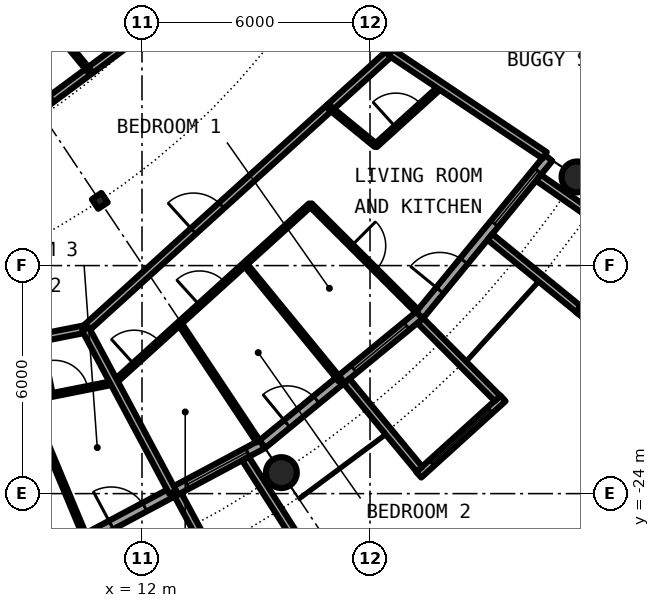
"""IFC4 building model, lengths in metres.
Left out: names, types, materials, properties, quantities, classifications, styles, units other than length and angle.
Written with IfcOpenShell. Run it as: python <this file> out.ifc"""

import sys

from ifc_helpers import new_model, si_unit, direction, frame, frame_2d, origin, origin_2d, place, context, subcontext, project, spatial, rectangle, circle, hollow_circle, i_section, extrude, element, fill, save


model = new_model("IFC4")
c1 = context("Model", 3, precision=1e-05, world=origin(), true_north=direction((0.0, 1.0)))
c2 = subcontext(c1, "Body", "Model", "MODEL_VIEW")
j1 = project(units=[si_unit("LENGTHUNIT", "METRE"), si_unit("PLANEANGLEUNIT", "RADIAN")], contexts=[c1])
p1 = place(None, origin())
s1 = spatial("IfcSite", under=j1, at=p1, CompositionType="ELEMENT")
p2 = place(p1, origin())
s2 = spatial("IfcBuilding", under=s1, at=p2, CompositionType="ELEMENT")
p3 = place(p2, frame((0.0, 0.0, 227.95)))
s3 = spatial("IfcBuildingStorey", under=s2, at=p3, CompositionType="ELEMENT", Elevation=227.95)
for number, where, z_axis, x_axis in (
    (1, (15.667, -23.448, 0.0), (0.0, 0.0, 1.0), (1.0, 0.0, 0.0)),
    (2, (23.448, -15.667, 0.0), (0.0, 0.0, 1.0), (1.0, 0.0, 0.0)),
):
    element("IfcColumn", number, at=place(p3, frame(where, z_axis=z_axis, x_axis=x_axis)), inside=s3, PredefinedType="COLUMN", context=c2, shape_type="SweptSolid", body=[
        extrude(hollow_circle(Radius=0.406, WallThickness=0.03, at=origin_2d()), origin(), (0.0, 0.0, 1.0), 3.05),
    ])
p4 = place(p3, frame((10.889, -16.297, 0.0), z_axis=(0.0, 0.0, 1.0), x_axis=(0.55557023302, -0.831469612303, 0.0)))
e3 = element("IfcColumn", 3, at=p4, inside=s3, PredefinedType="COLUMN", context=c2, shape_type="SweptSolid", body=[
    extrude(i_section(OverallWidth=0.3, OverallDepth=0.3, WebThickness=0.011, FlangeThickness=0.019, FilletRadius=0.027, at=origin_2d()), origin(), (0.0, 0.0, 1.0), 3.05),
])
p5 = place(p3, frame((10.447, -25.222, 0.0), z_axis=(0.0, 0.0, 1.0), x_axis=(0.881915646801, 0.471407246368, 0.0)))
e4 = element("IfcWall", 4, at=p5, inside=s3, PredefinedType="SOLIDWALL", context=c2, shape_type="SweptSolid", body=[
    extrude(rectangle(XDim=5.352, YDim=0.25, at=frame_2d((2.676, 0.0))), origin(), (0.0, 0.0, 1.0), 2.7),
])
p6 = place(p5, frame((0.841, 0.0, 0.0)))
e5 = element("IfcOpeningElement", 5, at=p6, cuts=e4, PredefinedType="OPENING", context=c2, shape_type="SweptSolid", body=[
    extrude(rectangle(XDim=1.0, YDim=2.2, at=frame_2d((0.5, 1.1))), frame((0.0, 0.135, 0.0), z_axis=(0.0, -1.0, 0.0), x_axis=(1.0, 0.0, 0.0)), (0.0, 0.0, 1.0), 0.27),
])
p7 = place(p5, frame((3.111, 0.0, 0.3)))
e6 = element("IfcOpeningElement", 6, at=p7, cuts=e4, PredefinedType="OPENING", context=c2, shape_type="SweptSolid", body=[
    extrude(rectangle(XDim=1.8, YDim=2.1, at=frame_2d((0.9, 1.05))), frame((0.0, 0.135, 0.0), z_axis=(0.0, -1.0, 0.0), x_axis=(1.0, 0.0, 0.0)), (0.0, 0.0, 1.0), 0.27),
])
p8 = place(p3, frame((12.945, -24.029, -0.03), z_axis=(0.0, 0.0, 1.0), x_axis=(0.474424310775, -0.88029629861, 0.0)))
e7 = element("IfcWall", 7, at=p8, inside=s3, PredefinedType="SOLIDWALL", context=c2, shape_type="SweptSolid", body=[
    extrude(rectangle(XDim=3.006, YDim=0.2, at=frame_2d((1.503, 0.0))), origin(), (0.0, 0.0, 1.0), 2.73),
])
p9 = place(p3, frame((14.722, -23.079, -0.03), z_axis=(0.0, 0.0, 1.0), x_axis=(0.537572179146, -0.843217737129, 0.0)))
e8 = element("IfcWall", 8, at=p9, inside=s3, PredefinedType="SOLIDWALL", context=c2, shape_type="SweptSolid", body=[
    extrude(rectangle(XDim=2.924, YDim=0.2, at=frame_2d((1.462, 0.0))), origin(), (0.0, 0.0, 1.0), 2.73),
])
p10 = place(p3, frame((15.167, -22.699, 0.0), z_axis=(0.0, 0.0, 1.0), x_axis=(0.773019449054, 0.634382322723, 0.0)))
e9 = element("IfcWall", 9, at=p10, inside=s3, PredefinedType="SOLIDWALL", context=c2, shape_type="SweptSolid", body=[
    extrude(rectangle(XDim=5.352, YDim=0.25, at=frame_2d((2.676, 0.0))), origin(), (0.0, 0.0, 1.0), 2.7),
])
p11 = place(p10, frame((0.841, 0.0, 0.0)))
e10 = element("IfcOpeningElement", 10, at=p11, cuts=e9, PredefinedType="OPENING", context=c2, shape_type="SweptSolid", body=[
    extrude(rectangle(XDim=1.0, YDim=2.2, at=frame_2d((0.5, 1.1))), frame((0.0, 0.135, 0.0), z_axis=(0.0, -1.0, 0.0), x_axis=(1.0, 0.0, 0.0)), (0.0, 0.0, 1.0), 0.27),
])
p12 = place(p10, frame((3.111, 0.0, 0.3)))
e11 = element("IfcOpeningElement", 11, at=p12, cuts=e9, PredefinedType="OPENING", context=c2, shape_type="SweptSolid", body=[
    extrude(rectangle(XDim=1.8, YDim=2.1, at=frame_2d((0.9, 1.05))), frame((0.0, 0.135, 0.0), z_axis=(0.0, -1.0, 0.0), x_axis=(1.0, 0.0, 0.0)), (0.0, 0.0, 1.0), 0.27),
])
p13 = place(p3, frame((19.282, -23.503, -0.03), z_axis=(0.0, 0.0, 1.0), x_axis=(0.740998365753, 0.671506829416, 0.0)))
e12 = element("IfcWall", 12, at=p13, inside=s3, PredefinedType="SOLIDWALL", context=c2, shape_type="SweptSolid", body=[
    extrude(rectangle(XDim=2.993, YDim=0.2, at=frame_2d((1.497, 0.0))), origin(), (0.0, 0.0, 1.0), 2.73),
])
p14 = place(p13, frame((0.457, 0.0, 0.33)))
e13 = element("IfcOpeningElement", 13, at=p14, cuts=e12, PredefinedType="OPENING", context=c2, shape_type="SweptSolid", body=[
    extrude(circle(Radius=1.04, at=frame_2d((1.04, 1.04))), frame((0.0, 0.11, 0.0), z_axis=(0.0, -1.0, 0.0), x_axis=(1.0, 0.0, 0.0)), (0.0, 0.0, 1.0), 0.22),
])
p15 = place(p3, frame((17.384, -21.041, -0.03), z_axis=(0.0, 0.0, 1.0), x_axis=(0.63709551667, -0.770784861449, 0.0)))
e14 = element("IfcWall", 14, at=p15, inside=s3, PredefinedType="SOLIDWALL", context=c2, shape_type="SweptSolid", body=[
    extrude(rectangle(XDim=3.006, YDim=0.2, at=frame_2d((1.503, 0.0))), origin(), (0.0, 0.0, 1.0), 2.73),
])
p16 = place(p3, frame((19.323, -19.45, -0.03), z_axis=(0.0, 0.0, 1.0), x_axis=(0.704476739375, -0.709727076896, 0.0)))
e15 = element("IfcWall", 15, at=p16, inside=s3, PredefinedType="SOLIDWALL", context=c2, shape_type="SweptSolid", body=[
    extrude(rectangle(XDim=2.883, YDim=0.2, at=frame_2d((1.441, 0.0))), origin(), (0.0, 0.0, 1.0), 2.73),
])
p17 = place(p3, frame((19.304, -19.304, 0.0), z_axis=(0.0, 0.0, 1.0), x_axis=(0.634382322723, 0.773019449054, 0.0)))
e16 = element("IfcWall", 16, at=p17, inside=s3, PredefinedType="SOLIDWALL", context=c2, shape_type="SweptSolid", body=[
    extrude(rectangle(XDim=5.352, YDim=0.25, at=frame_2d((2.676, 0.0))), origin(), (0.0, 0.0, 1.0), 2.7),
])
p18 = place(p17, frame((0.841, 0.0, 0.0)))
e17 = element("IfcOpeningElement", 17, at=p18, cuts=e16, PredefinedType="OPENING", context=c2, shape_type="SweptSolid", body=[
    extrude(rectangle(XDim=1.0, YDim=2.2, at=frame_2d((0.5, 1.1))), frame((0.0, 0.135, 0.0), z_axis=(0.0, -1.0, 0.0), x_axis=(1.0, 0.0, 0.0)), (0.0, 0.0, 1.0), 0.27),
])
p19 = place(p17, frame((3.111, 0.0, 0.3)))
e18 = element("IfcOpeningElement", 18, at=p19, cuts=e16, PredefinedType="OPENING", context=c2, shape_type="SweptSolid", body=[
    extrude(rectangle(XDim=1.8, YDim=2.1, at=frame_2d((0.9, 1.05))), frame((0.0, 0.135, 0.0), z_axis=(0.0, -1.0, 0.0), x_axis=(1.0, 0.0, 0.0)), (0.0, 0.0, 1.0), 0.27),
])
p20 = place(p3, frame((23.497, -19.289, -0.03), z_axis=(0.0, 0.0, 1.0), x_axis=(0.602806268067, 0.797887588059, 0.0)))
e19 = element("IfcWall", 19, at=p20, inside=s3, PredefinedType="SOLIDWALL", context=c2, shape_type="SweptSolid", body=[
    extrude(rectangle(XDim=2.447, YDim=0.2, at=frame_2d((1.223, 0.0))), origin(), (0.0, 0.0, 1.0), 2.73),
])
p21 = place(p20, frame((0.183, 0.0, 0.33)))
e20 = element("IfcOpeningElement", 20, at=p21, cuts=e19, PredefinedType="OPENING", context=c2, shape_type="SweptSolid", body=[
    extrude(circle(Radius=1.04, at=frame_2d((1.04, 1.04))), frame((0.0, 0.11, 0.0), z_axis=(0.0, -1.0, 0.0), x_axis=(1.0, 0.0, 0.0)), (0.0, 0.0, 1.0), 0.22),
])
p22 = place(p3, frame((21.155, -17.246, -0.03), z_axis=(0.0, 0.0, 1.0), x_axis=(0.775179004516, -0.631741648902, 0.0)))
e21 = element("IfcWall", 21, at=p22, inside=s3, PredefinedType="SOLIDWALL", context=c2, shape_type="SweptSolid", body=[
    extrude(rectangle(XDim=3.006, YDim=0.2, at=frame_2d((1.503, 0.0))), origin(), (0.0, 0.0, 1.0), 2.73),
])
p23 = place(p3, frame((22.433, -15.688, -0.03), z_axis=(0.0, 0.0, 1.0), x_axis=(0.819373043115, -0.573260687834, 0.0)))
e22 = element("IfcWall", 22, at=p23, inside=s3, PredefinedType="SOLIDWALL", context=c2, shape_type="SweptSolid", body=[
    extrude(rectangle(XDim=2.925, YDim=0.2, at=frame_2d((1.463, 0.0))), origin(), (0.0, 0.0, 1.0), 2.73),
])
p24 = place(p3, frame((11.266, -21.078, 0.0), z_axis=(0.0, 0.0, 1.0), x_axis=(0.74114118713, 0.671349194339, 0.0)))
e23 = element("IfcWall", 23, at=p24, inside=s3, PredefinedType="PARTITIONING", context=c2, shape_type="SweptSolid", body=[
    extrude(rectangle(XDim=6.965, YDim=0.1, at=frame_2d((3.482, 0.0))), origin(), (0.0, 0.0, 1.0), 2.7),
])
p25 = place(p24, frame((3.034, 0.0, 0.0)))
e24 = element("IfcOpeningElement", 24, at=p25, cuts=e23, PredefinedType="OPENING", context=c2, shape_type="SweptSolid", body=[
    extrude(rectangle(XDim=0.9, YDim=2.3, at=frame_2d((0.45, 1.15))), frame((0.0, 0.06, 0.0), z_axis=(0.0, -1.0, 0.0), x_axis=(1.0, 0.0, 0.0)), (0.0, 0.0, 1.0), 0.12),
])
p26 = place(p24, frame((0.712, 0.0, 0.0)))
e25 = element("IfcOpeningElement", 25, at=p26, cuts=e23, PredefinedType="OPENING", context=c2, shape_type="SweptSolid", body=[
    extrude(rectangle(XDim=0.9, YDim=2.3, at=frame_2d((0.45, 1.15))), frame((0.0, 0.06, 0.0), z_axis=(0.0, -1.0, 0.0), x_axis=(1.0, 0.0, 0.0)), (0.0, 0.0, 1.0), 0.12),
])
p27 = place(p3, frame((18.147, -14.844, 0.0), z_axis=(0.0, 0.0, 1.0), x_axis=(0.741080073381, 0.671416655169, 0.0)))
e26 = element("IfcWall", 26, at=p27, inside=s3, PredefinedType="PARTITIONING", context=c2, shape_type="SweptSolid", body=[
    extrude(rectangle(XDim=2.323, YDim=0.1, at=frame_2d((1.162, 0.0))), origin(), (0.0, 0.0, 1.0), 2.7),
])
p28 = place(p27, frame((0.718, 0.0, 0.0)))
e27 = element("IfcOpeningElement", 27, at=p28, cuts=e26, PredefinedType="OPENING", context=c2, shape_type="SweptSolid", body=[
    extrude(rectangle(XDim=0.9, YDim=2.3, at=frame_2d((0.45, 1.15))), frame((0.0, 0.06, 0.0), z_axis=(0.0, -1.0, 0.0), x_axis=(1.0, 0.0, 0.0)), (0.0, 0.0, 1.0), 0.12),
])
p29 = place(p3, frame((4.46, -22.433, 0.0), z_axis=(0.0, 0.0, 1.0), x_axis=(0.980795304313, 0.195039921651, 0.0)))
e28 = element("IfcWall", 28, at=p29, inside=s3, PredefinedType="PARTITIONING", context=c2, shape_type="SweptSolid", body=[
    extrude(rectangle(XDim=6.937, YDim=0.1, at=frame_2d((3.469, 0.0))), origin(), (0.0, 0.0, 1.0), 2.7),
])
p30 = place(p29, frame((3.021, 0.0, 0.0)))
e29 = element("IfcOpeningElement", 29, at=p30, cuts=e28, PredefinedType="OPENING", context=c2, shape_type="SweptSolid", body=[
    extrude(rectangle(XDim=0.9, YDim=2.3, at=frame_2d((0.45, 1.15))), frame((0.0, 0.06, 0.0), z_axis=(0.0, -1.0, 0.0), x_axis=(1.0, 0.0, 0.0)), (0.0, 0.0, 1.0), 0.12),
])
p31 = place(p29, frame((5.334, 0.0, 0.0)))
e30 = element("IfcOpeningElement", 30, at=p31, cuts=e28, PredefinedType="OPENING", context=c2, shape_type="SweptSolid", body=[
    extrude(rectangle(XDim=0.9, YDim=2.3, at=frame_2d((0.45, 1.15))), frame((0.0, 0.06, 0.0), z_axis=(0.0, -1.0, 0.0), x_axis=(1.0, 0.0, 0.0)), (0.0, 0.0, 1.0), 0.12),
])
p32 = place(p3, frame((18.542, -12.389, 0.0), z_axis=(0.0, 0.0, 1.0), x_axis=(0.465812036273, 0.88488369115, 0.0)))
e31 = element("IfcWall", 31, at=p32, inside=s3, PredefinedType="PARTITIONING", context=c2, shape_type="SweptSolid", body=[
    extrude(rectangle(XDim=1.687, YDim=0.2, at=frame_2d((0.844, 0.0))), origin(), (0.0, 0.0, 1.0), 2.7),
])
p33 = place(p3, frame((10.512, -19.667, 0.0), z_axis=(0.0, 0.0, 1.0), x_axis=(0.740947367223, 0.671563101283, 0.0)))
e32 = element("IfcWall", 32, at=p33, inside=s3, PredefinedType="PARTITIONING", context=c2, shape_type="SweptSolid", body=[
    extrude(rectangle(XDim=10.837, YDim=0.2, at=frame_2d((5.419, 0.0))), origin(), (0.0, 0.0, 1.0), 2.7),
])
p34 = place(p33, frame((3.835, 0.0, 0.0)))
e33 = element("IfcOpeningElement", 33, at=p34, cuts=e32, PredefinedType="OPENING", context=c2, shape_type="SweptSolid", body=[
    extrude(rectangle(XDim=1.0, YDim=2.3, at=frame_2d((0.5, 1.15))), frame((0.0, 0.11, 0.0), z_axis=(0.0, -1.0, 0.0), x_axis=(1.0, 0.0, 0.0)), (0.0, 0.0, 1.0), 0.22),
])
p35 = place(p3, frame((-2.186, -22.193, 0.0), z_axis=(0.0, 0.0, 1.0), x_axis=(0.980780341017, 0.195115152343, 0.0)))
e34 = element("IfcWall", 34, at=p35, inside=s3, PredefinedType="PARTITIONING", context=c2, shape_type="SweptSolid", body=[
    extrude(rectangle(XDim=12.947, YDim=0.2, at=frame_2d((6.473, 0.0))), origin(), (0.0, 0.0, 1.0), 2.7),
])
p36 = place(p35, frame((7.053, 0.0, 0.0)))
e35 = element("IfcOpeningElement", 35, at=p36, cuts=e34, PredefinedType="OPENING", context=c2, shape_type="SweptSolid", body=[
    extrude(rectangle(XDim=1.0, YDim=2.3, at=frame_2d((0.5, 1.15))), frame((0.0, 0.11, 0.0), z_axis=(0.0, -1.0, 0.0), x_axis=(1.0, 0.0, 0.0)), (0.0, 0.0, 1.0), 0.22),
])
p37 = place(p3, frame((5.137, -16.938, 0.0), z_axis=(0.0, 0.0, 1.0), x_axis=(0.803240181354, 0.595655278712, 0.0)))
e36 = element("IfcWall", 36, at=p37, inside=s3, PredefinedType="PARTITIONING", context=c2, shape_type="SweptSolid", body=[
    extrude(rectangle(XDim=11.928, YDim=0.2, at=frame_2d((5.964, 0.0))), origin(), (0.0, 0.0, 1.0), 2.7),
])
p38 = place(p37, frame((4.612, 0.0, 0.0)))
e37 = element("IfcOpeningElement", 37, at=p38, cuts=e36, PredefinedType="OPENING", context=c2, shape_type="SweptSolid", body=[
    extrude(rectangle(XDim=1.0, YDim=2.3, at=frame_2d((0.5, 1.15))), frame((0.0, 0.11, 0.0), z_axis=(0.0, -1.0, 0.0), x_axis=(1.0, 0.0, 0.0)), (0.0, 0.0, 1.0), 0.22),
])
p39 = place(p3, frame((4.908, -5.959, 0.0), z_axis=(0.0, 0.0, 1.0), x_axis=(0.636115614725, -0.771593756262, 0.0)))
e38 = element("IfcWall", 38, at=p39, inside=s3, PredefinedType="PARTITIONING", context=c2, shape_type="SweptSolid", body=[
    extrude(rectangle(XDim=8.967, YDim=0.1, at=frame_2d((4.483, 0.0))), origin(), (0.0, 0.0, 1.0), 2.7),
])
p40 = place(p39, frame((6.4, 0.0, 0.0)))
e39 = element("IfcOpeningElement", 39, at=p40, cuts=e38, PredefinedType="OPENING", context=c2, shape_type="SweptSolid", body=[
    extrude(rectangle(XDim=0.9, YDim=2.3, at=frame_2d((0.45, 1.15))), frame((0.0, 0.06, 0.0), z_axis=(0.0, -1.0, 0.0), x_axis=(1.0, 0.0, 0.0)), (0.0, 0.0, 1.0), 0.12),
])
p41 = place(p39, frame((1.917, 0.0, 0.0)))
e40 = element("IfcOpeningElement", 40, at=p41, cuts=e38, PredefinedType="OPENING", context=c2, shape_type="SweptSolid", body=[
    extrude(rectangle(XDim=0.9, YDim=2.3, at=frame_2d((0.45, 1.15))), frame((0.0, 0.06, 0.0), z_axis=(0.0, -1.0, 0.0), x_axis=(1.0, 0.0, 0.0)), (0.0, 0.0, 1.0), 0.12),
])
p42 = place(p3, frame((8.998, -21.529, 0.0), z_axis=(0.0, 0.0, 1.0), x_axis=(0.385572005139, -0.922677749192, 0.0)))
e41 = element("IfcWall", 41, at=p42, inside=s3, PredefinedType="PARTITIONING", context=c2, shape_type="SweptSolid", body=[
    extrude(rectangle(XDim=3.841, YDim=0.1, at=frame_2d((1.92, 0.0))), origin(), (0.0, 0.0, 1.0), 2.7),
])
p43 = place(p3, frame((10.512, -19.667, 0.0), z_axis=(0.0, 0.0, 1.0), x_axis=(0.471427642527, -0.881904744211, 0.0)))
e42 = element("IfcWall", 42, at=p43, inside=s3, PredefinedType="PARTITIONING", context=c2, shape_type="SweptSolid", body=[
    extrude(rectangle(XDim=4.875, YDim=0.2, at=frame_2d((2.438, 0.0))), origin(), (0.0, 0.0, 1.0), 2.7),
])
p44 = place(p3, frame((12.988, -19.518, 0.0), z_axis=(0.0, 0.0, 1.0), x_axis=(0.553823887887, -0.83263383381, 0.0)))
e43 = element("IfcWall", 43, at=p44, inside=s3, PredefinedType="PARTITIONING", context=c2, shape_type="SweptSolid", body=[
    extrude(rectangle(XDim=3.73, YDim=0.1, at=frame_2d((1.865, 0.0))), origin(), (0.0, 0.0, 1.0), 2.7),
])
p45 = place(p3, frame((14.709, -17.958, 0.0), z_axis=(0.0, 0.0, 1.0), x_axis=(0.633590098448, -0.773668913133, 0.0)))
e44 = element("IfcWall", 44, at=p45, inside=s3, PredefinedType="PARTITIONING", context=c2, shape_type="SweptSolid", body=[
    extrude(rectangle(XDim=3.962, YDim=0.1, at=frame_2d((1.981, 0.0))), origin(), (0.0, 0.0, 1.0), 2.7),
])
p46 = place(p3, frame((16.43, -16.398, 0.0), z_axis=(0.0, 0.0, 1.0), x_axis=(0.707722727509, -0.706490297858, 0.0)))
e45 = element("IfcWall", 45, at=p46, inside=s3, PredefinedType="PARTITIONING", context=c2, shape_type="SweptSolid", body=[
    extrude(rectangle(XDim=3.962, YDim=0.1, at=frame_2d((1.981, 0.0))), origin(), (0.0, 0.0, 1.0), 2.7),
])
p47 = place(p46, frame((1.531, 0.0, 0.0)))
e46 = element("IfcOpeningElement", 46, at=p47, cuts=e45, PredefinedType="OPENING", context=c2, shape_type="SweptSolid", body=[
    extrude(rectangle(XDim=0.9, YDim=2.3, at=frame_2d((0.45, 1.15))), frame((0.0, 0.06, 0.0), z_axis=(0.0, -1.0, 0.0), x_axis=(1.0, 0.0, 0.0)), (0.0, 0.0, 1.0), 0.12),
])
p48 = place(p3, frame((16.936, -13.845, 0.0), z_axis=(0.0, 0.0, 1.0), x_axis=(0.774283039722, -0.632839453889, 0.0)))
e47 = element("IfcWall", 47, at=p48, inside=s3, PredefinedType="PARTITIONING", context=c2, shape_type="SweptSolid", body=[
    extrude(rectangle(XDim=1.569, YDim=0.1, at=frame_2d((0.785, 0.0))), origin(), (0.0, 0.0, 1.0), 2.7),
])
p49 = place(p3, frame((18.542, -12.389, 0.0), z_axis=(0.0, 0.0, 1.0), x_axis=(0.831387096605, -0.55569370664, 0.0)))
e48 = element("IfcWall", 48, at=p49, inside=s3, PredefinedType="PARTITIONING", context=c2, shape_type="SweptSolid", body=[
    extrude(rectangle(XDim=4.875, YDim=0.2, at=frame_2d((2.438, 0.0))), origin(), (0.0, 0.0, 1.0), 2.7),
])
p50 = place(p6, origin())
e49 = element("IfcDoor", 49, at=p50, inside=s3, OperationType="SINGLE_SWING_LEFT", PredefinedType="DOOR", context=c2, shape_type="SweptSolid", body=[
    extrude(rectangle(XDim=1.0, YDim=2.2, at=frame_2d((0.5, 1.1))), frame((0.0, 0.025, 0.0), z_axis=(0.0, -1.0, 0.0), x_axis=(1.0, 0.0, 0.0)), (0.0, 0.0, 1.0), 0.05),
])
fill(e5, e49)
p51 = place(p7, origin())
e50 = element("IfcWindow", 50, at=p51, inside=s3, PartitioningType="SINGLE_PANEL", PredefinedType="WINDOW", context=c2, shape_type="SweptSolid", body=[
    extrude(rectangle(XDim=1.8, YDim=2.1, at=frame_2d((0.9, 1.05))), frame((0.0, 0.03, 0.0), z_axis=(0.0, -1.0, 0.0), x_axis=(1.0, 0.0, 0.0)), (0.0, 0.0, 1.0), 0.06),
])
fill(e6, e50)
p52 = place(p11, origin())
e51 = element("IfcDoor", 51, at=p52, inside=s3, OperationType="SINGLE_SWING_LEFT", PredefinedType="DOOR", context=c2, shape_type="SweptSolid", body=[
    extrude(rectangle(XDim=1.0, YDim=2.2, at=frame_2d((0.5, 1.1))), frame((0.0, 0.025, 0.0), z_axis=(0.0, -1.0, 0.0), x_axis=(1.0, 0.0, 0.0)), (0.0, 0.0, 1.0), 0.05),
])
fill(e10, e51)
p53 = place(p12, origin())
e52 = element("IfcWindow", 52, at=p53, inside=s3, PartitioningType="SINGLE_PANEL", PredefinedType="WINDOW", context=c2, shape_type="SweptSolid", body=[
    extrude(rectangle(XDim=1.8, YDim=2.1, at=frame_2d((0.9, 1.05))), frame((0.0, 0.03, 0.0), z_axis=(0.0, -1.0, 0.0), x_axis=(1.0, 0.0, 0.0)), (0.0, 0.0, 1.0), 0.06),
])
fill(e11, e52)
p54 = place(p14, origin())
e53 = element("IfcWindow", 53, at=p54, inside=s3, PartitioningType="SINGLE_PANEL", PredefinedType="WINDOW", context=c2, shape_type="SweptSolid", body=[
    extrude(circle(Radius=1.04, at=frame_2d((1.04, 1.04))), frame((0.0, 0.03, 0.0), z_axis=(0.0, -1.0, 0.0), x_axis=(1.0, 0.0, 0.0)), (0.0, 0.0, 1.0), 0.06),
])
fill(e13, e53)
p55 = place(p18, origin())
e54 = element("IfcDoor", 54, at=p55, inside=s3, OperationType="SINGLE_SWING_LEFT", PredefinedType="DOOR", context=c2, shape_type="SweptSolid", body=[
    extrude(rectangle(XDim=1.0, YDim=2.2, at=frame_2d((0.5, 1.1))), frame((0.0, 0.025, 0.0), z_axis=(0.0, -1.0, 0.0), x_axis=(1.0, 0.0, 0.0)), (0.0, 0.0, 1.0), 0.05),
])
fill(e17, e54)
p56 = place(p19, origin())
e55 = element("IfcWindow", 55, at=p56, inside=s3, PartitioningType="SINGLE_PANEL", PredefinedType="WINDOW", context=c2, shape_type="SweptSolid", body=[
    extrude(rectangle(XDim=1.8, YDim=2.1, at=frame_2d((0.9, 1.05))), frame((0.0, 0.03, 0.0), z_axis=(0.0, -1.0, 0.0), x_axis=(1.0, 0.0, 0.0)), (0.0, 0.0, 1.0), 0.06),
])
fill(e18, e55)
p57 = place(p31, origin())
e56 = element("IfcDoor", 56, at=p57, inside=s3, OperationType="SINGLE_SWING_RIGHT", PredefinedType="DOOR", context=c2, shape_type="SweptSolid", body=[
    extrude(rectangle(XDim=0.9, YDim=2.3, at=frame_2d((0.45, 1.15))), frame((0.0, 0.025, 0.0), z_axis=(0.0, -1.0, 0.0), x_axis=(1.0, 0.0, 0.0)), (0.0, 0.0, 1.0), 0.05),
])
fill(e30, e56)
p58 = place(p34, origin())
e57 = element("IfcDoor", 57, at=p58, inside=s3, OperationType="SINGLE_SWING_LEFT", PredefinedType="DOOR", context=c2, shape_type="SweptSolid", body=[
    extrude(rectangle(XDim=1.0, YDim=2.3, at=frame_2d((0.5, 1.15))), frame((0.0, 0.025, 0.0), z_axis=(0.0, -1.0, 0.0), x_axis=(1.0, 0.0, 0.0)), (0.0, 0.0, 1.0), 0.05),
])
fill(e33, e57)
p59 = place(p28, origin())
e58 = element("IfcDoor", 58, at=p59, inside=s3, OperationType="SINGLE_SWING_RIGHT", PredefinedType="DOOR", context=c2, shape_type="SweptSolid", body=[
    extrude(rectangle(XDim=0.9, YDim=2.3, at=frame_2d((0.45, 1.15))), frame((0.0, 0.025, 0.0), z_axis=(0.0, -1.0, 0.0), x_axis=(1.0, 0.0, 0.0)), (0.0, 0.0, 1.0), 0.05),
])
fill(e27, e58)
p60 = place(p47, origin())
e59 = element("IfcDoor", 59, at=p60, inside=s3, OperationType="SINGLE_SWING_RIGHT", PredefinedType="DOOR", context=c2, shape_type="SweptSolid", body=[
    extrude(rectangle(XDim=0.9, YDim=2.3, at=frame_2d((0.45, 1.15))), frame((0.0, 0.025, 0.0), z_axis=(0.0, -1.0, 0.0), x_axis=(1.0, 0.0, 0.0)), (0.0, 0.0, 1.0), 0.05),
])
fill(e46, e59)
p61 = place(p25, origin())
e60 = element("IfcDoor", 60, at=p61, inside=s3, OperationType="SINGLE_SWING_RIGHT", PredefinedType="DOOR", context=c2, shape_type="SweptSolid", body=[
    extrude(rectangle(XDim=0.9, YDim=2.3, at=frame_2d((0.45, 1.15))), frame((0.0, 0.025, 0.0), z_axis=(0.0, -1.0, 0.0), x_axis=(1.0, 0.0, 0.0)), (0.0, 0.0, 1.0), 0.05),
])
fill(e24, e60)
p62 = place(p26, origin())
e61 = element("IfcDoor", 61, at=p62, inside=s3, OperationType="SINGLE_SWING_LEFT", PredefinedType="DOOR", context=c2, shape_type="SweptSolid", body=[
    extrude(rectangle(XDim=0.9, YDim=2.3, at=frame_2d((0.45, 1.15))), frame((0.0, 0.025, 0.0), z_axis=(0.0, -1.0, 0.0), x_axis=(1.0, 0.0, 0.0)), (0.0, 0.0, 1.0), 0.05),
])
fill(e25, e61)
p63 = place(p38, origin())
e62 = element("IfcDoor", 62, at=p63, inside=s3, OperationType="SINGLE_SWING_LEFT", PredefinedType="DOOR", context=c2, shape_type="SweptSolid", body=[
    extrude(rectangle(XDim=1.0, YDim=2.3, at=frame_2d((0.5, 1.15))), frame((0.0, 0.025, 0.0), z_axis=(0.0, -1.0, 0.0), x_axis=(1.0, 0.0, 0.0)), (0.0, 0.0, 1.0), 0.05),
])
fill(e37, e62)
save(model, sys.argv[1])
